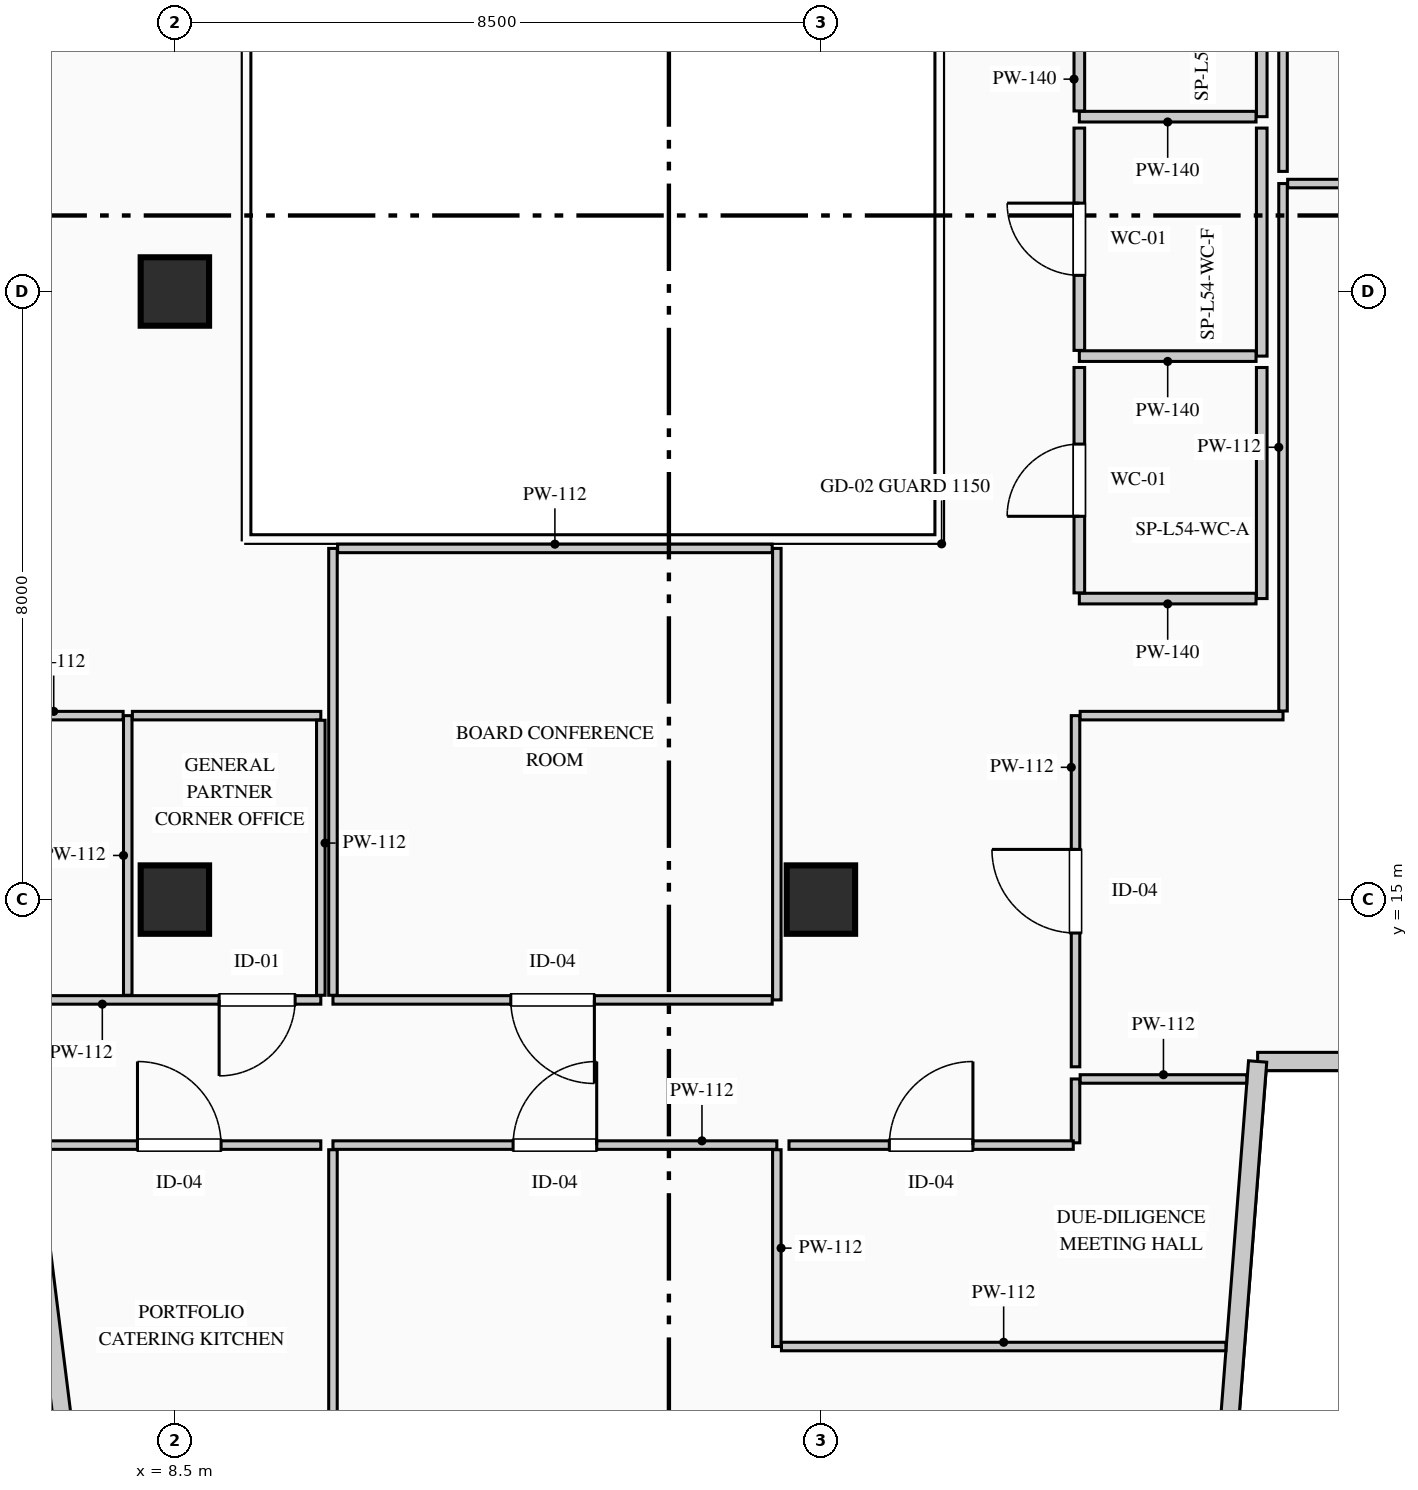
"""IFC4 building model, lengths in metres.
Left out: names, types, materials, properties, quantities, classifications, styles, units other than length and angle.
Written with IfcOpenShell. Run it as: python <this file> out.ifc"""

import sys

from ifc_helpers import new_model, si_unit, direction, frame, frame_2d, origin, origin_2d, place, context, subcontext, project, spatial, rectangle, extrude, element, fill, save


model = new_model("IFC4")
c1 = context("Model", 3, precision=1e-05, world=origin(), true_north=direction((0.0, 1.0)))
c2 = subcontext(c1, "Body", "Model", "MODEL_VIEW")
j1 = project(units=[si_unit("LENGTHUNIT", "METRE"), si_unit("PLANEANGLEUNIT", "RADIAN")], contexts=[c1])
p1 = place(None, origin())
s1 = spatial("IfcSite", under=j1, at=p1, CompositionType="ELEMENT")
p2 = place(p1, origin())
s2 = spatial("IfcBuilding", under=s1, at=p2, CompositionType="ELEMENT")
p3 = place(p2, frame((0.0, 0.0, 227.2)))
s3 = spatial("IfcBuildingStorey", under=s2, at=p3, CompositionType="ELEMENT", Elevation=227.2)
for number, where, z_axis, x_axis in (
    (1, (8.5, 15.0, 0.0), (0.0, 0.0, 1.0), (1.0, 0.0, 0.0)),
    (2, (8.5, 23.0, 0.0), (0.0, 0.0, 1.0), (1.0, 0.0, 0.0)),
    (3, (17.0, 15.0, 0.0), (0.0, 0.0, 1.0), (1.0, 0.0, 0.0)),
):
    element("IfcColumn", number, at=place(p3, frame(where, z_axis=z_axis, x_axis=x_axis)), inside=s3, PredefinedType="COLUMN", context=c2, shape_type="SweptSolid", body=[
        extrude(rectangle(XDim=0.9, YDim=0.9, at=origin_2d()), origin(), (0.0, 0.0, 1.0), 3.95),
    ])
p4 = place(p3, frame((7.46, 4.62, 0.0), z_axis=(0.0, 0.0, 1.0), x_axis=(-0.123515576323, 0.992342633573, 0.0)))
e4 = element("IfcWall", 4, at=p4, inside=s3, PredefinedType="STANDARD", context=c2, shape_type="SweptSolid", body=[
    extrude(rectangle(XDim=37.043, YDim=0.24, at=frame_2d((18.522, 0.0))), origin(), (0.0, 0.0, 1.0), 3.7),
])
p5 = place(p4, frame((9.536, 0.0, 0.9)))
e5 = element("IfcOpeningElement", 5, at=p5, cuts=e4, PredefinedType="OPENING", context=c2, shape_type="SweptSolid", body=[
    extrude(rectangle(XDim=2.7, YDim=2.1, at=frame_2d((1.35, 1.05))), frame((0.0, 0.13, 0.0), z_axis=(0.0, -1.0, 0.0), x_axis=(1.0, 0.0, 0.0)), (0.0, 0.0, 1.0), 0.26),
])
p6 = place(p3, frame((29.581, 12.87, 0.0), z_axis=(0.0, 0.0, 1.0), x_axis=(-1.0, 0.0, 0.0)))
e6 = element("IfcWall", 6, at=p6, inside=s3, PredefinedType="STANDARD", context=c2, shape_type="SweptSolid", body=[
    extrude(rectangle(XDim=6.834, YDim=0.24, at=frame_2d((3.417, 0.0))), origin(), (0.0, 0.0, 1.0), 3.7),
])
p7 = place(p6, frame((1.26, 0.0, 0.9)))
e7 = element("IfcOpeningElement", 7, at=p7, cuts=e6, PredefinedType="OPENING", context=c2, shape_type="SweptSolid", body=[
    extrude(rectangle(XDim=2.4, YDim=2.1, at=frame_2d((1.2, 1.05))), frame((0.0, 0.13, 0.0), z_axis=(0.0, -1.0, 0.0), x_axis=(1.0, 0.0, 0.0)), (0.0, 0.0, 1.0), 0.26),
])
p8 = place(p3, frame((22.746, 12.87, 0.0), z_axis=(0.0, 0.0, 1.0), x_axis=(-0.077816860153, -0.996967670627, 0.0)))
e8 = element("IfcWall", 8, at=p8, inside=s3, PredefinedType="STANDARD", context=c2, shape_type="SweptSolid", body=[
    extrude(rectangle(XDim=10.281, YDim=0.24, at=frame_2d((5.141, 0.0))), origin(), (0.0, 0.0, 1.0), 3.7),
])
p9 = place(p8, frame((6.202, 0.0, 0.9)))
e9 = element("IfcOpeningElement", 9, at=p9, cuts=e8, PredefinedType="OPENING", context=c2, shape_type="SweptSolid", body=[
    extrude(rectangle(XDim=2.4, YDim=2.1, at=frame_2d((1.2, 1.05))), frame((0.0, 0.13, 0.0), z_axis=(0.0, -1.0, 0.0), x_axis=(1.0, 0.0, 0.0)), (0.0, 0.0, 1.0), 0.26),
])
p10 = place(p3, frame((22.8, 28.95, 0.0), z_axis=(0.0, 0.0, 1.0), x_axis=(0.0, -1.0, 0.0)))
e10 = element("IfcWall", 10, at=p10, inside=s3, PredefinedType="PARTITIONING", context=c2, shape_type="SweptSolid", body=[
    extrude(rectangle(XDim=3.65, YDim=0.14, at=frame_2d((1.825, 0.0))), origin(), (0.0, 0.0, 1.0), 3.385),
])
p11 = place(p3, frame((22.725, 25.3, 0.0), z_axis=(0.0, 0.0, 1.0), x_axis=(-1.0, 0.0, 0.0)))
e11 = element("IfcWall", 11, at=p11, inside=s3, PredefinedType="PARTITIONING", context=c2, shape_type="SweptSolid", body=[
    extrude(rectangle(XDim=2.325, YDim=0.14, at=frame_2d((1.163, 0.0))), origin(), (0.0, 0.0, 1.0), 3.7),
])
p12 = place(p3, frame((20.4, 25.375, 0.0), z_axis=(0.0, 0.0, 1.0), x_axis=(0.0, 1.0, 0.0)))
e12 = element("IfcWall", 12, at=p12, inside=s3, PredefinedType="PARTITIONING", context=c2, shape_type="SweptSolid", body=[
    extrude(rectangle(XDim=3.575, YDim=0.14, at=frame_2d((1.788, 0.0))), origin(), (0.0, 0.0, 1.0), 3.7),
])
p13 = place(p12, frame((1.312, 0.0, 0.0)))
e13 = element("IfcOpeningElement", 13, at=p13, cuts=e12, PredefinedType="OPENING", context=c2, shape_type="SweptSolid", body=[
    extrude(rectangle(XDim=0.95, YDim=2.15, at=frame_2d((0.475, 1.075))), frame((0.0, 0.08, 0.0), z_axis=(0.0, -1.0, 0.0), x_axis=(1.0, 0.0, 0.0)), (0.0, 0.0, 1.0), 0.16),
])
p14 = place(p3, frame((22.8, 25.15, 0.0), z_axis=(0.0, 0.0, 1.0), x_axis=(0.0, -1.0, 0.0)))
e14 = element("IfcWall", 14, at=p14, inside=s3, PredefinedType="PARTITIONING", context=c2, shape_type="SweptSolid", body=[
    extrude(rectangle(XDim=3.0, YDim=0.14, at=frame_2d((1.5, 0.0))), origin(), (0.0, 0.0, 1.0), 3.385),
])
p15 = place(p3, frame((22.725, 22.15, 0.0), z_axis=(0.0, 0.0, 1.0), x_axis=(-1.0, 0.0, 0.0)))
e15 = element("IfcWall", 15, at=p15, inside=s3, PredefinedType="PARTITIONING", context=c2, shape_type="SweptSolid", body=[
    extrude(rectangle(XDim=2.325, YDim=0.14, at=frame_2d((1.163, 0.0))), origin(), (0.0, 0.0, 1.0), 3.7),
])
p16 = place(p3, frame((20.4, 22.225, 0.0), z_axis=(0.0, 0.0, 1.0), x_axis=(0.0, 1.0, 0.0)))
e16 = element("IfcWall", 16, at=p16, inside=s3, PredefinedType="PARTITIONING", context=c2, shape_type="SweptSolid", body=[
    extrude(rectangle(XDim=2.925, YDim=0.14, at=frame_2d((1.462, 0.0))), origin(), (0.0, 0.0, 1.0), 3.7),
])
p17 = place(p16, frame((0.988, 0.0, 0.0)))
e17 = element("IfcOpeningElement", 17, at=p17, cuts=e16, PredefinedType="OPENING", context=c2, shape_type="SweptSolid", body=[
    extrude(rectangle(XDim=0.95, YDim=2.15, at=frame_2d((0.475, 1.075))), frame((0.0, 0.08, 0.0), z_axis=(0.0, -1.0, 0.0), x_axis=(1.0, 0.0, 0.0)), (0.0, 0.0, 1.0), 0.16),
])
p18 = place(p3, frame((22.8, 22.0, 0.0), z_axis=(0.0, 0.0, 1.0), x_axis=(0.0, -1.0, 0.0)))
e18 = element("IfcWall", 18, at=p18, inside=s3, PredefinedType="PARTITIONING", context=c2, shape_type="SweptSolid", body=[
    extrude(rectangle(XDim=3.04, YDim=0.14, at=frame_2d((1.52, 0.0))), origin(), (0.0, 0.0, 1.0), 3.385),
])
p19 = place(p3, frame((22.725, 18.96, 0.0), z_axis=(0.0, 0.0, 1.0), x_axis=(-1.0, 0.0, 0.0)))
e19 = element("IfcWall", 19, at=p19, inside=s3, PredefinedType="PARTITIONING", context=c2, shape_type="SweptSolid", body=[
    extrude(rectangle(XDim=2.325, YDim=0.14, at=frame_2d((1.163, 0.0))), origin(), (0.0, 0.0, 1.0), 3.7),
])
p20 = place(p3, frame((20.4, 19.035, 0.0), z_axis=(0.0, 0.0, 1.0), x_axis=(0.0, 1.0, 0.0)))
e20 = element("IfcWall", 20, at=p20, inside=s3, PredefinedType="PARTITIONING", context=c2, shape_type="SweptSolid", body=[
    extrude(rectangle(XDim=2.965, YDim=0.14, at=frame_2d((1.482, 0.0))), origin(), (0.0, 0.0, 1.0), 3.7),
])
p21 = place(p20, frame((1.008, 0.0, 0.0)))
e21 = element("IfcOpeningElement", 21, at=p21, cuts=e20, PredefinedType="OPENING", context=c2, shape_type="SweptSolid", body=[
    extrude(rectangle(XDim=0.95, YDim=2.15, at=frame_2d((0.475, 1.075))), frame((0.0, 0.08, 0.0), z_axis=(0.0, -1.0, 0.0), x_axis=(1.0, 0.0, 0.0)), (0.0, 0.0, 1.0), 0.16),
])
p22 = place(p3, frame((10.58, 11.77, 0.0), z_axis=(0.0, 0.0, 1.0), x_axis=(1.0, 0.0, 0.0)))
e22 = element("IfcWall", 22, at=p22, inside=s3, PredefinedType="PARTITIONING", context=c2, shape_type="SweptSolid", body=[
    extrude(rectangle(XDim=5.84, YDim=0.112, at=frame_2d((2.92, 0.0))), origin(), (0.0, 0.0, 1.0), 3.7),
])
p23 = place(p22, frame((2.37, 0.0, 0.0)))
e23 = element("IfcOpeningElement", 23, at=p23, cuts=e22, PredefinedType="OPENING", context=c2, shape_type="SweptSolid", body=[
    extrude(rectangle(XDim=1.1, YDim=2.2, at=frame_2d((0.55, 1.1))), frame((0.0, 0.066, 0.0), z_axis=(0.0, -1.0, 0.0), x_axis=(1.0, 0.0, 0.0)), (0.0, 0.0, 1.0), 0.132),
])
p24 = place(p3, frame((16.42, 11.709, 0.0), z_axis=(0.0, 0.0, 1.0), x_axis=(0.0, -1.0, 0.0)))
e24 = element("IfcWall", 24, at=p24, inside=s3, PredefinedType="PARTITIONING", context=c2, shape_type="SweptSolid", body=[
    extrude(rectangle(XDim=2.589, YDim=0.112, at=frame_2d((1.294, 0.0))), origin(), (0.0, 0.0, 1.0), 3.7),
])
p25 = place(p3, frame((16.481, 9.12, 0.0), z_axis=(0.0, 0.0, 1.0), x_axis=(1.0, 0.0, 0.0)))
e25 = element("IfcWall", 25, at=p25, inside=s3, PredefinedType="PARTITIONING", context=c2, shape_type="SweptSolid", body=[
    extrude(rectangle(XDim=5.847, YDim=0.112, at=frame_2d((2.923, 0.0))), origin(), (0.0, 0.0, 1.0), 3.7),
])
p26 = place(p3, frame((10.58, 2.745, 0.0), z_axis=(0.0, 0.0, 1.0), x_axis=(0.0, 1.0, 0.0)))
e26 = element("IfcWall", 26, at=p26, inside=s3, PredefinedType="PARTITIONING", context=c2, shape_type="SweptSolid", body=[
    extrude(rectangle(XDim=8.964, YDim=0.112, at=frame_2d((4.482, 0.0))), origin(), (0.0, 0.0, 1.0), 3.7),
])
p27 = place(p3, frame((6.696, 11.77, 0.0), z_axis=(0.0, 0.0, 1.0), x_axis=(1.0, 0.0, 0.0)))
e27 = element("IfcWall", 27, at=p27, inside=s3, PredefinedType="PARTITIONING", context=c2, shape_type="SweptSolid", body=[
    extrude(rectangle(XDim=3.724, YDim=0.112, at=frame_2d((1.862, 0.0))), origin(), (0.0, 0.0, 1.0), 3.7),
])
p28 = place(p27, frame((1.312, 0.0, 0.0)))
e28 = element("IfcOpeningElement", 28, at=p28, cuts=e27, PredefinedType="OPENING", context=c2, shape_type="SweptSolid", body=[
    extrude(rectangle(XDim=1.1, YDim=2.2, at=frame_2d((0.55, 1.1))), frame((0.0, 0.066, 0.0), z_axis=(0.0, -1.0, 0.0), x_axis=(1.0, 0.0, 0.0)), (0.0, 0.0, 1.0), 0.132),
])
p29 = place(p3, frame((20.35, 11.8, 0.0), z_axis=(0.0, 0.0, 1.0), x_axis=(0.0, 1.0, 0.0)))
e29 = element("IfcWall", 29, at=p29, inside=s3, PredefinedType="PARTITIONING", context=c2, shape_type="SweptSolid", body=[
    extrude(rectangle(XDim=0.84, YDim=0.112, at=frame_2d((0.42, 0.0))), origin(), (0.0, 0.0, 1.0), 3.7),
])
p30 = place(p3, frame((20.411, 12.64, 0.0), z_axis=(0.0, 0.0, 1.0), x_axis=(1.0, 0.0, 0.0)))
e30 = element("IfcWall", 30, at=p30, inside=s3, PredefinedType="PARTITIONING", context=c2, shape_type="SweptSolid", body=[
    extrude(rectangle(XDim=2.192, YDim=0.112, at=frame_2d((1.096, 0.0))), origin(), (0.0, 0.0, 1.0), 3.7),
])
p31 = place(p3, frame((16.58, 11.77, 0.0), z_axis=(0.0, 0.0, 1.0), x_axis=(1.0, 0.0, 0.0)))
e31 = element("IfcWall", 31, at=p31, inside=s3, PredefinedType="PARTITIONING", context=c2, shape_type="SweptSolid", body=[
    extrude(rectangle(XDim=3.74, YDim=0.112, at=frame_2d((1.87, 0.0))), origin(), (0.0, 0.0, 1.0), 3.7),
])
p32 = place(p31, frame((1.32, 0.0, 0.0)))
e32 = element("IfcOpeningElement", 32, at=p32, cuts=e31, PredefinedType="OPENING", context=c2, shape_type="SweptSolid", body=[
    extrude(rectangle(XDim=1.1, YDim=2.2, at=frame_2d((0.55, 1.1))), frame((0.0, 0.066, 0.0), z_axis=(0.0, -1.0, 0.0), x_axis=(1.0, 0.0, 0.0)), (0.0, 0.0, 1.0), 0.132),
])
p33 = place(p3, frame((10.42, 13.68, 0.0), z_axis=(0.0, 0.0, 1.0), x_axis=(-1.0, 0.0, 0.0)))
e33 = element("IfcWall", 33, at=p33, inside=s3, PredefinedType="PARTITIONING", context=c2, shape_type="SweptSolid", body=[
    extrude(rectangle(XDim=3.961, YDim=0.112, at=frame_2d((1.981, 0.0))), origin(), (0.0, 0.0, 1.0), 3.7),
])
p34 = place(p33, frame((0.338, 0.0, 0.0)))
e34 = element("IfcOpeningElement", 34, at=p34, cuts=e33, PredefinedType="OPENING", context=c2, shape_type="SweptSolid", body=[
    extrude(rectangle(XDim=1.0, YDim=2.15, at=frame_2d((0.5, 1.075))), frame((0.0, 0.066, 0.0), z_axis=(0.0, -1.0, 0.0), x_axis=(1.0, 0.0, 0.0)), (0.0, 0.0, 1.0), 0.132),
])
p35 = place(p3, frame((7.88, 13.741, 0.0), z_axis=(0.0, 0.0, 1.0), x_axis=(0.0, 1.0, 0.0)))
e35 = element("IfcWall", 35, at=p35, inside=s3, PredefinedType="PARTITIONING", context=c2, shape_type="SweptSolid", body=[
    extrude(rectangle(XDim=3.679, YDim=0.112, at=frame_2d((1.839, 0.0))), origin(), (0.0, 0.0, 1.0), 3.7),
])
p36 = place(p3, frame((5.993, 17.42, 0.0), z_axis=(0.0, 0.0, 1.0), x_axis=(1.0, 0.0, 0.0)))
e36 = element("IfcWall", 36, at=p36, inside=s3, PredefinedType="PARTITIONING", context=c2, shape_type="SweptSolid", body=[
    extrude(rectangle(XDim=1.826, YDim=0.112, at=frame_2d((0.913, 0.0))), origin(), (0.0, 0.0, 1.0), 3.7),
])
p37 = place(p3, frame((7.941, 17.42, 0.0), z_axis=(0.0, 0.0, 1.0), x_axis=(1.0, 0.0, 0.0)))
e37 = element("IfcWall", 37, at=p37, inside=s3, PredefinedType="PARTITIONING", context=c2, shape_type="SweptSolid", body=[
    extrude(rectangle(XDim=2.479, YDim=0.112, at=frame_2d((1.24, 0.0))), origin(), (0.0, 0.0, 1.0), 3.7),
])
p38 = place(p3, frame((10.42, 17.359, 0.0), z_axis=(0.0, 0.0, 1.0), x_axis=(0.0, -1.0, 0.0)))
e38 = element("IfcWall", 38, at=p38, inside=s3, PredefinedType="PARTITIONING", context=c2, shape_type="SweptSolid", body=[
    extrude(rectangle(XDim=3.618, YDim=0.112, at=frame_2d((1.809, 0.0))), origin(), (0.0, 0.0, 1.0), 3.7),
])
p39 = place(p3, frame((16.42, 19.62, 0.0), z_axis=(0.0, 0.0, 1.0), x_axis=(0.0, -1.0, 0.0)))
e39 = element("IfcWall", 39, at=p39, inside=s3, PredefinedType="PARTITIONING", context=c2, shape_type="SweptSolid", body=[
    extrude(rectangle(XDim=5.94, YDim=0.112, at=frame_2d((2.97, 0.0))), origin(), (0.0, 0.0, 1.0), 3.7),
])
p40 = place(p3, frame((16.359, 13.68, 0.0), z_axis=(0.0, 0.0, 1.0), x_axis=(-1.0, 0.0, 0.0)))
e40 = element("IfcWall", 40, at=p40, inside=s3, PredefinedType="PARTITIONING", context=c2, shape_type="SweptSolid", body=[
    extrude(rectangle(XDim=5.779, YDim=0.112, at=frame_2d((2.889, 0.0))), origin(), (0.0, 0.0, 1.0), 3.7),
])
p41 = place(p40, frame((2.34, 0.0, 0.0)))
e41 = element("IfcOpeningElement", 41, at=p41, cuts=e40, PredefinedType="OPENING", context=c2, shape_type="SweptSolid", body=[
    extrude(rectangle(XDim=1.1, YDim=2.2, at=frame_2d((0.55, 1.1))), frame((0.0, 0.066, 0.0), z_axis=(0.0, -1.0, 0.0), x_axis=(1.0, 0.0, 0.0)), (0.0, 0.0, 1.0), 0.132),
])
p42 = place(p3, frame((10.58, 13.741, 0.0), z_axis=(0.0, 0.0, 1.0), x_axis=(0.0, 1.0, 0.0)))
e42 = element("IfcWall", 42, at=p42, inside=s3, PredefinedType="PARTITIONING", context=c2, shape_type="SweptSolid", body=[
    extrude(rectangle(XDim=5.879, YDim=0.112, at=frame_2d((2.939, 0.0))), origin(), (0.0, 0.0, 1.0), 3.7),
])
p43 = place(p3, frame((10.641, 19.62, 0.0), z_axis=(0.0, 0.0, 1.0), x_axis=(1.0, 0.0, 0.0)))
e43 = element("IfcWall", 43, at=p43, inside=s3, PredefinedType="PARTITIONING", context=c2, shape_type="SweptSolid", body=[
    extrude(rectangle(XDim=5.718, YDim=0.112, at=frame_2d((2.859, 0.0))), origin(), (0.0, 0.0, 1.0), 3.7),
])
p44 = place(p3, frame((20.35, 12.8, 0.0), z_axis=(0.0, 0.0, 1.0), x_axis=(0.0, 1.0, 0.0)))
e44 = element("IfcWall", 44, at=p44, inside=s3, PredefinedType="PARTITIONING", context=c2, shape_type="SweptSolid", body=[
    extrude(rectangle(XDim=4.62, YDim=0.112, at=frame_2d((2.31, 0.0))), origin(), (0.0, 0.0, 1.0), 3.7),
])
p45 = place(p44, frame((1.76, 0.0, 0.0)))
e45 = element("IfcOpeningElement", 45, at=p45, cuts=e44, PredefinedType="OPENING", context=c2, shape_type="SweptSolid", body=[
    extrude(rectangle(XDim=1.1, YDim=2.2, at=frame_2d((0.55, 1.1))), frame((0.0, 0.066, 0.0), z_axis=(0.0, -1.0, 0.0), x_axis=(1.0, 0.0, 0.0)), (0.0, 0.0, 1.0), 0.132),
])
p46 = place(p3, frame((20.411, 17.42, 0.0), z_axis=(0.0, 0.0, 1.0), x_axis=(1.0, 0.0, 0.0)))
e46 = element("IfcWall", 46, at=p46, inside=s3, PredefinedType="PARTITIONING", context=c2, shape_type="SweptSolid", body=[
    extrude(rectangle(XDim=2.669, YDim=0.112, at=frame_2d((1.334, 0.0))), origin(), (0.0, 0.0, 1.0), 3.7),
])
p47 = place(p3, frame((23.08, 17.481, 0.0), z_axis=(0.0, 0.0, 1.0), x_axis=(0.0, 1.0, 0.0)))
e47 = element("IfcWall", 47, at=p47, inside=s3, PredefinedType="PARTITIONING", context=c2, shape_type="SweptSolid", body=[
    extrude(rectangle(XDim=6.939, YDim=0.112, at=frame_2d((3.469, 0.0))), origin(), (0.0, 0.0, 1.0), 3.385),
])
p48 = place(p3, frame((23.141, 24.42, 0.0), z_axis=(0.0, 0.0, 1.0), x_axis=(1.0, 0.0, 0.0)))
e48 = element("IfcWall", 48, at=p48, inside=s3, PredefinedType="PARTITIONING", context=c2, shape_type="SweptSolid", body=[
    extrude(rectangle(XDim=3.079, YDim=0.112, at=frame_2d((1.54, 0.0))), origin(), (0.0, 0.0, 1.0), 3.385),
])
p49 = place(p3, frame((23.08, 24.58, 0.0), z_axis=(0.0, 0.0, 1.0), x_axis=(0.0, 1.0, 0.0)))
e49 = element("IfcWall", 49, at=p49, inside=s3, PredefinedType="PARTITIONING", context=c2, shape_type="SweptSolid", body=[
    extrude(rectangle(XDim=4.379, YDim=0.112, at=frame_2d((2.189, 0.0))), origin(), (0.0, 0.0, 1.0), 3.385),
])
p50 = place(p17, origin())
e50 = element("IfcDoor", 50, at=p50, inside=s3, OperationType="SINGLE_SWING_RIGHT", PredefinedType="DOOR", context=c2, shape_type="SweptSolid", body=[
    extrude(rectangle(XDim=0.95, YDim=2.15, at=frame_2d((0.475, 1.075))), frame((0.0, 0.025, 0.0), z_axis=(0.0, -1.0, 0.0), x_axis=(1.0, 0.0, 0.0)), (0.0, 0.0, 1.0), 0.05),
])
fill(e17, e50)
p51 = place(p21, origin())
e51 = element("IfcDoor", 51, at=p51, inside=s3, OperationType="SINGLE_SWING_LEFT", PredefinedType="DOOR", context=c2, shape_type="SweptSolid", body=[
    extrude(rectangle(XDim=0.95, YDim=2.15, at=frame_2d((0.475, 1.075))), frame((0.0, 0.025, 0.0), z_axis=(0.0, -1.0, 0.0), x_axis=(1.0, 0.0, 0.0)), (0.0, 0.0, 1.0), 0.05),
])
fill(e21, e51)
p52 = place(p23, origin())
e52 = element("IfcDoor", 52, at=p52, inside=s3, OperationType="SINGLE_SWING_RIGHT", PredefinedType="DOOR", context=c2, shape_type="SweptSolid", body=[
    extrude(rectangle(XDim=1.1, YDim=2.2, at=frame_2d((0.55, 1.1))), frame((0.0, 0.025, 0.0), z_axis=(0.0, -1.0, 0.0), x_axis=(1.0, 0.0, 0.0)), (0.0, 0.0, 1.0), 0.05),
])
fill(e23, e52)
p53 = place(p28, origin())
e53 = element("IfcDoor", 53, at=p53, inside=s3, OperationType="SINGLE_SWING_LEFT", PredefinedType="DOOR", context=c2, shape_type="SweptSolid", body=[
    extrude(rectangle(XDim=1.1, YDim=2.2, at=frame_2d((0.55, 1.1))), frame((0.0, 0.025, 0.0), z_axis=(0.0, -1.0, 0.0), x_axis=(1.0, 0.0, 0.0)), (0.0, 0.0, 1.0), 0.05),
])
fill(e28, e53)
p54 = place(p32, origin())
e54 = element("IfcDoor", 54, at=p54, inside=s3, OperationType="SINGLE_SWING_RIGHT", PredefinedType="DOOR", context=c2, shape_type="SweptSolid", body=[
    extrude(rectangle(XDim=1.1, YDim=2.2, at=frame_2d((0.55, 1.1))), frame((0.0, 0.025, 0.0), z_axis=(0.0, -1.0, 0.0), x_axis=(1.0, 0.0, 0.0)), (0.0, 0.0, 1.0), 0.05),
])
fill(e32, e54)
p55 = place(p34, origin())
e55 = element("IfcDoor", 55, at=p55, inside=s3, OperationType="SINGLE_SWING_RIGHT", PredefinedType="DOOR", context=c2, shape_type="SweptSolid", body=[
    extrude(rectangle(XDim=1.0, YDim=2.15, at=frame_2d((0.5, 1.075))), frame((0.0, 0.025, 0.0), z_axis=(0.0, -1.0, 0.0), x_axis=(1.0, 0.0, 0.0)), (0.0, 0.0, 1.0), 0.05),
])
fill(e34, e55)
p56 = place(p41, origin())
e56 = element("IfcDoor", 56, at=p56, inside=s3, OperationType="SINGLE_SWING_LEFT", PredefinedType="DOOR", context=c2, shape_type="SweptSolid", body=[
    extrude(rectangle(XDim=1.1, YDim=2.2, at=frame_2d((0.55, 1.1))), frame((0.0, 0.025, 0.0), z_axis=(0.0, -1.0, 0.0), x_axis=(1.0, 0.0, 0.0)), (0.0, 0.0, 1.0), 0.05),
])
fill(e41, e56)
p57 = place(p45, origin())
e57 = element("IfcDoor", 57, at=p57, inside=s3, OperationType="SINGLE_SWING_RIGHT", PredefinedType="DOOR", context=c2, shape_type="SweptSolid", body=[
    extrude(rectangle(XDim=1.1, YDim=2.2, at=frame_2d((0.55, 1.1))), frame((0.0, 0.025, 0.0), z_axis=(0.0, -1.0, 0.0), x_axis=(1.0, 0.0, 0.0)), (0.0, 0.0, 1.0), 0.05),
])
fill(e45, e57)
save(model, sys.argv[1])
